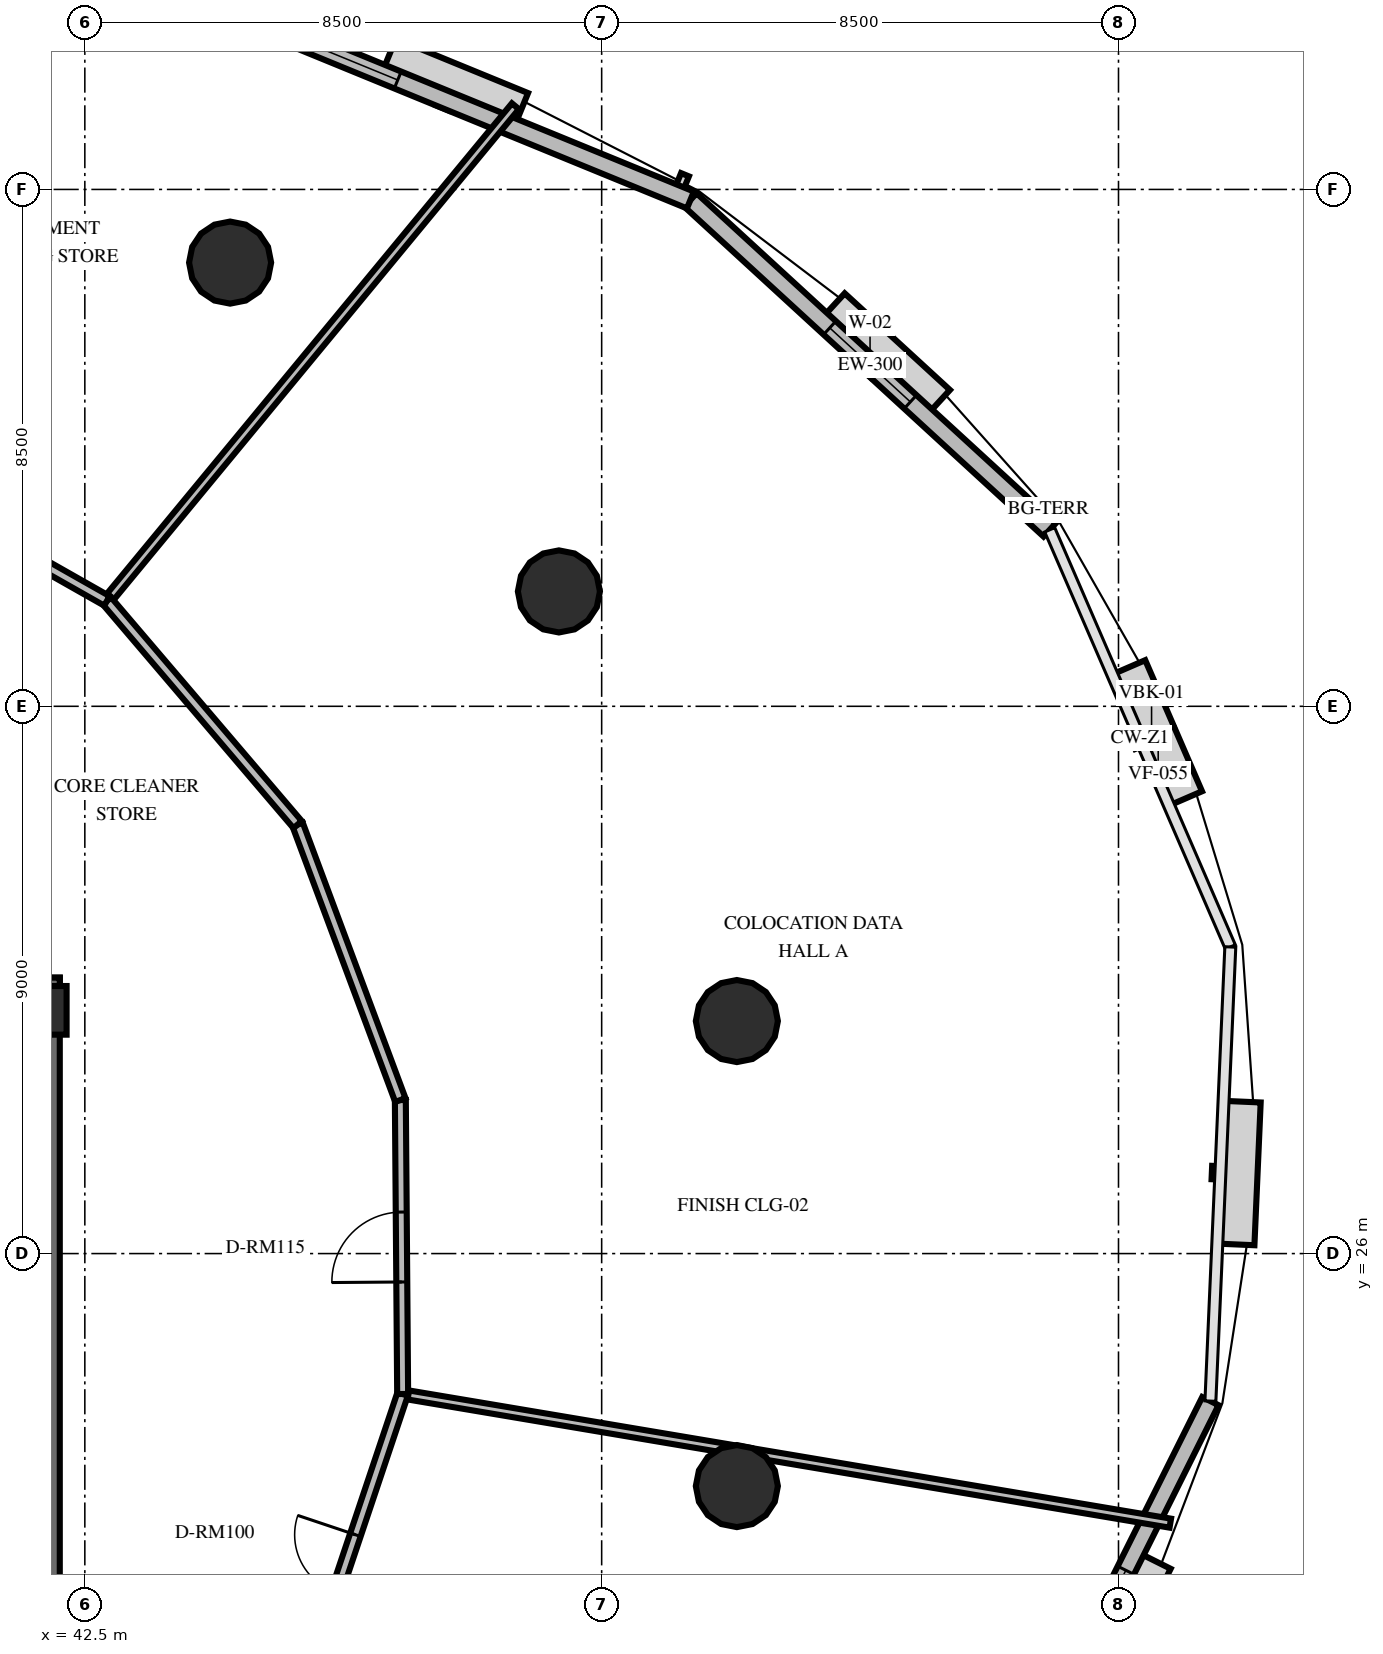
"""IFC4 building model, lengths in metres.
Left out: names, types, materials, properties, quantities, classifications, styles, units other than length and angle.
Written with IfcOpenShell. Run it as: python <this file> out.ifc"""

import sys

from ifc_helpers import new_model, si_unit, direction, frame, frame_2d, origin, origin_2d, place, context, subcontext, project, spatial, rectangle, circle, extrude, element, fill, save


model = new_model("IFC4")
c1 = context("Model", 3, precision=1e-05, world=origin(), true_north=direction((0.0, 1.0)))
c2 = subcontext(c1, "Body", "Model", "MODEL_VIEW")
j1 = project(units=[si_unit("LENGTHUNIT", "METRE"), si_unit("PLANEANGLEUNIT", "RADIAN")], contexts=[c1])
p1 = place(None, origin())
s1 = spatial("IfcSite", under=j1, at=p1, CompositionType="ELEMENT")
p2 = place(p1, origin())
s2 = spatial("IfcBuilding", under=s1, at=p2, CompositionType="ELEMENT")
p3 = place(p2, frame((0.0, 0.0, 76.2)))
s3 = spatial("IfcBuildingStorey", under=s2, at=p3, CompositionType="ELEMENT", Elevation=76.2)
p4 = place(p3, frame((25.922, 30.088, 0.0), z_axis=(0.0, 0.0, 1.0), x_axis=(1.0, 0.0, 0.0)))
e1 = element("IfcWall", 1, at=p4, inside=s3, PredefinedType="SHEAR", context=c2, shape_type="SweptSolid", body=[
    extrude(rectangle(XDim=16.166, YDim=0.9, at=frame_2d((8.083, 0.0))), origin(), (0.0, 0.0, 1.0), 4.2),
])
p5 = place(p4, frame((1.028, 0.0, 0.0)))
e2 = element("IfcOpeningElement", 2, at=p5, cuts=e1, PredefinedType="OPENING", context=c2, shape_type="SweptSolid", body=[
    extrude(rectangle(XDim=1.05, YDim=2.15, at=frame_2d((0.525, 1.075))), frame((0.0, 0.46, 0.0), z_axis=(0.0, -1.0, 0.0), x_axis=(1.0, 0.0, 0.0)), (0.0, 0.0, 1.0), 0.92),
])
p6 = place(p4, frame((14.078, 0.0, 0.0)))
e3 = element("IfcOpeningElement", 3, at=p6, cuts=e1, PredefinedType="OPENING", context=c2, shape_type="SweptSolid", body=[
    extrude(rectangle(XDim=1.05, YDim=2.15, at=frame_2d((0.525, 1.075))), frame((0.0, 0.46, 0.0), z_axis=(0.0, -1.0, 0.0), x_axis=(1.0, 0.0, 0.0)), (0.0, 0.0, 1.0), 0.92),
])
p7 = place(p4, frame((7.528, 0.0, 0.0)))
e4 = element("IfcOpeningElement", 4, at=p7, cuts=e1, PredefinedType="OPENING", context=c2, shape_type="SweptSolid", body=[
    extrude(rectangle(XDim=1.1, YDim=2.15, at=frame_2d((0.55, 1.075))), frame((0.0, 0.46, 0.0), z_axis=(0.0, -1.0, 0.0), x_axis=(1.0, 0.0, 0.0)), (0.0, 0.0, 1.0), 0.92),
])
p8 = place(p3, frame((41.638, 19.662, 0.0), z_axis=(0.0, 0.0, 1.0), x_axis=(0.0, 1.0, 0.0)))
e5 = element("IfcWall", 5, at=p8, inside=s3, PredefinedType="SHEAR", context=c2, shape_type="SweptSolid", body=[
    extrude(rectangle(XDim=10.876, YDim=0.9, at=frame_2d((5.438, 0.0))), origin(), (0.0, 0.0, 1.0), 4.2),
])
p9 = place(p3, frame((41.8, 30.0, 0.0), z_axis=(0.0, 0.0, 1.0), x_axis=(1.0, 0.0, 0.0)))
e6 = element("IfcColumn", 6, at=p9, inside=s3, PredefinedType="PILASTER", context=c2, shape_type="SweptSolid", body=[
    extrude(rectangle(XDim=0.8, YDim=0.8, at=origin_2d()), origin(), (0.0, 0.0, 1.0), 4.2),
])
for number, where, z_axis, x_axis in (
    (7, (53.223, 29.824, 0.0), (0.0, 0.0, 1.0), (1.0, 0.0, 0.0)),
    (8, (50.297, 36.889, 0.0), (0.0, 0.0, 1.0), (1.0, 0.0, 0.0)),
    (9, (44.889, 42.297, 0.0), (0.0, 0.0, 1.0), (1.0, 0.0, 0.0)),
    (10, (53.223, 22.176, 0.0), (0.0, 0.0, 1.0), (1.0, 0.0, 0.0)),
):
    element("IfcColumn", number, at=place(p3, frame(where, z_axis=z_axis, x_axis=x_axis)), inside=s3, PredefinedType="COLUMN", context=c2, shape_type="SweptSolid", body=[
        extrude(circle(Radius=0.675, at=origin_2d()), origin(), (0.0, 0.0, 1.0), 4.2),
    ])
p10 = place(p3, frame((58.369, 37.902, 0.0), z_axis=(0.0, 0.0, 1.0), x_axis=(-0.736682732999, 0.676238531068, 0.0)))
e11 = element("IfcWall", 11, at=p10, inside=s3, PredefinedType="SOLIDWALL", context=c2, shape_type="SweptSolid", body=[
    extrude(rectangle(XDim=8.022, YDim=0.3, at=frame_2d((4.011, 0.0))), origin(), (0.0, 0.0, 1.0), 3.0),
])
p11 = place(p10, frame((3.111, 0.0, 0.8)))
e12 = element("IfcOpeningElement", 12, at=p11, cuts=e11, PredefinedType="OPENING", context=c2, shape_type="SweptSolid", body=[
    extrude(rectangle(XDim=1.8, YDim=1.95, at=frame_2d((0.9, 0.975))), frame((0.0, 0.16, 0.0), z_axis=(0.0, -1.0, 0.0), x_axis=(1.0, 0.0, 0.0)), (0.0, 0.0, 1.0), 0.32),
])
p12 = place(p3, frame((52.459, 43.327, 0.0), z_axis=(0.0, 0.0, 1.0), x_axis=(-0.925289325161, 0.379262000131, 0.0)))
e13 = element("IfcWall", 13, at=p12, inside=s3, PredefinedType="SOLIDWALL", context=c2, shape_type="SweptSolid", body=[
    extrude(rectangle(XDim=8.793, YDim=0.3, at=frame_2d((4.396, 0.0))), origin(), (0.0, 0.0, 1.0), 3.0),
])
p13 = place(p12, frame((5.202, 0.0, 0.8)))
e14 = element("IfcOpeningElement", 14, at=p13, cuts=e13, PredefinedType="OPENING", context=c2, shape_type="SweptSolid", body=[
    extrude(rectangle(XDim=1.8, YDim=1.95, at=frame_2d((0.9, 0.975))), frame((0.0, 0.16, 0.0), z_axis=(0.0, -1.0, 0.0), x_axis=(1.0, 0.0, 0.0)), (0.0, 0.0, 1.0), 0.32),
])
p14 = place(p3, frame((57.426, 16.398, 0.0), z_axis=(0.0, 0.0, 1.0), x_axis=(0.44697009801, 0.894548898319, 0.0)))
e15 = element("IfcWall", 15, at=p14, inside=s3, PredefinedType="SOLIDWALL", context=c2, shape_type="SweptSolid", body=[
    extrude(rectangle(XDim=8.022, YDim=0.3, at=frame_2d((4.011, 0.0))), origin(), (0.0, 0.0, 1.0), 3.0),
])
p15 = place(p14, frame((3.111, 0.0, 0.8)))
e16 = element("IfcOpeningElement", 16, at=p15, cuts=e15, PredefinedType="OPENING", context=c2, shape_type="SweptSolid", body=[
    extrude(rectangle(XDim=1.8, YDim=1.95, at=frame_2d((0.9, 0.975))), frame((0.0, 0.16, 0.0), z_axis=(0.0, -1.0, 0.0), x_axis=(1.0, 0.0, 0.0)), (0.0, 0.0, 1.0), 0.32),
])
p16 = place(p3, frame((47.727, 23.691, 0.0), z_axis=(0.0, 0.0, 1.0), x_axis=(0.986140728359, -0.165911011907, 0.0)))
e17 = element("IfcWall", 17, at=p16, inside=s3, PredefinedType="PARTITIONING", context=c2, shape_type="SweptSolid", body=[
    extrude(rectangle(XDim=12.802, YDim=0.15, at=frame_2d((6.401, 0.0))), origin(), (0.0, 0.0, 1.0), 3.0),
])
p17 = place(p3, frame((46.342, 19.562, 0.0), z_axis=(0.0, 0.0, 1.0), x_axis=(0.318127487837, 0.948047942608, 0.0)))
e18 = element("IfcWall", 18, at=p17, inside=s3, PredefinedType="PARTITIONING", context=c2, shape_type="SweptSolid", body=[
    extrude(rectangle(XDim=4.355, YDim=0.18, at=frame_2d((2.178, 0.0))), origin(), (0.0, 0.0, 1.0), 3.0),
])
p18 = place(p17, frame((0.914, 0.0, 0.0)))
e19 = element("IfcOpeningElement", 19, at=p18, cuts=e18, PredefinedType="OPENING", context=c2, shape_type="SweptSolid", body=[
    extrude(rectangle(XDim=1.0, YDim=2.15, at=frame_2d((0.5, 1.075))), frame((0.0, 0.1, 0.0), z_axis=(0.0, -1.0, 0.0), x_axis=(1.0, 0.0, 0.0)), (0.0, 0.0, 1.0), 0.2),
])
p19 = place(p3, frame((42.864, 36.733, 0.0), z_axis=(0.0, 0.0, 1.0), x_axis=(0.636757052036, 0.771064495799, 0.0)))
e20 = element("IfcWall", 20, at=p19, inside=s3, PredefinedType="PARTITIONING", context=c2, shape_type="SweptSolid", body=[
    extrude(rectangle(XDim=10.55, YDim=0.15, at=frame_2d((5.275, 0.0))), origin(), (0.0, 0.0, 1.0), 3.0),
])
p20 = place(p3, frame((47.727, 23.691, 0.0), z_axis=(0.0, 0.0, 1.0), x_axis=(-0.007827647661, 0.999969363497, 0.0)))
e21 = element("IfcWall", 21, at=p20, inside=s3, PredefinedType="PARTITIONING", context=c2, shape_type="SweptSolid", body=[
    extrude(rectangle(XDim=4.834, YDim=0.18, at=frame_2d((2.417, 0.0))), origin(), (0.0, 0.0, 1.0), 3.0),
])
p21 = place(p20, frame((1.842, 0.0, 0.0)))
e22 = element("IfcOpeningElement", 22, at=p21, cuts=e21, PredefinedType="OPENING", context=c2, shape_type="SweptSolid", body=[
    extrude(rectangle(XDim=1.15, YDim=2.15, at=frame_2d((0.575, 1.075))), frame((0.0, 0.1, 0.0), z_axis=(0.0, -1.0, 0.0), x_axis=(1.0, 0.0, 0.0)), (0.0, 0.0, 1.0), 0.2),
])
p22 = place(p3, frame((47.689, 28.525, 0.0), z_axis=(0.0, 0.0, 1.0), x_axis=(-0.349423780352, 0.936964792148, 0.0)))
e23 = element("IfcWall", 23, at=p22, inside=s3, PredefinedType="PARTITIONING", context=c2, shape_type="SweptSolid", body=[
    extrude(rectangle(XDim=4.834, YDim=0.18, at=frame_2d((2.417, 0.0))), origin(), (0.0, 0.0, 1.0), 3.0),
])
p23 = place(p3, frame((46.0, 33.054, 0.0), z_axis=(0.0, 0.0, 1.0), x_axis=(-0.648772052091, 0.760982801662, 0.0)))
e24 = element("IfcWall", 24, at=p23, inside=s3, PredefinedType="PARTITIONING", context=c2, shape_type="SweptSolid", body=[
    extrude(rectangle(XDim=4.834, YDim=0.18, at=frame_2d((2.417, 0.0))), origin(), (0.0, 0.0, 1.0), 3.0),
])
p24 = place(p3, frame((42.864, 36.733, 0.0), z_axis=(0.0, 0.0, 1.0), x_axis=(-0.869944192354, 0.493150182186, 0.0)))
e25 = element("IfcWall", 25, at=p24, inside=s3, PredefinedType="PARTITIONING", context=c2, shape_type="SweptSolid", body=[
    extrude(rectangle(XDim=4.834, YDim=0.18, at=frame_2d((2.417, 0.0))), origin(), (0.0, 0.0, 1.0), 3.0),
])
p25 = place(p24, frame((2.801, 0.0, 0.0)))
e26 = element("IfcOpeningElement", 26, at=p25, cuts=e25, PredefinedType="OPENING", context=c2, shape_type="SweptSolid", body=[
    extrude(rectangle(XDim=1.0, YDim=2.15, at=frame_2d((0.5, 1.075))), frame((0.0, 0.1, 0.0), z_axis=(0.0, -1.0, 0.0), x_axis=(1.0, 0.0, 0.0)), (0.0, 0.0, 1.0), 0.2),
])
p26 = place(p11, origin())
e27 = element("IfcWindow", 27, at=p26, inside=s3, PartitioningType="SINGLE_PANEL", PredefinedType="WINDOW", context=c2, shape_type="SweptSolid", body=[
    extrude(rectangle(XDim=1.8, YDim=1.95, at=frame_2d((0.9, 0.975))), frame((0.0, 0.03, 0.0), z_axis=(0.0, -1.0, 0.0), x_axis=(1.0, 0.0, 0.0)), (0.0, 0.0, 1.0), 0.06),
])
fill(e12, e27)
p27 = place(p13, origin())
e28 = element("IfcWindow", 28, at=p27, inside=s3, PartitioningType="SINGLE_PANEL", PredefinedType="WINDOW", context=c2, shape_type="SweptSolid", body=[
    extrude(rectangle(XDim=1.8, YDim=1.95, at=frame_2d((0.9, 0.975))), frame((0.0, 0.03, 0.0), z_axis=(0.0, -1.0, 0.0), x_axis=(1.0, 0.0, 0.0)), (0.0, 0.0, 1.0), 0.06),
])
fill(e14, e28)
p28 = place(p15, origin())
e29 = element("IfcWindow", 29, at=p28, inside=s3, PartitioningType="SINGLE_PANEL", PredefinedType="WINDOW", context=c2, shape_type="SweptSolid", body=[
    extrude(rectangle(XDim=1.8, YDim=1.95, at=frame_2d((0.9, 0.975))), frame((0.0, 0.03, 0.0), z_axis=(0.0, -1.0, 0.0), x_axis=(1.0, 0.0, 0.0)), (0.0, 0.0, 1.0), 0.06),
])
fill(e16, e29)
p29 = place(p18, origin())
e30 = element("IfcDoor", 30, at=p29, inside=s3, OperationType="SINGLE_SWING_RIGHT", PredefinedType="DOOR", context=c2, shape_type="SweptSolid", body=[
    extrude(rectangle(XDim=1.0, YDim=2.15, at=frame_2d((0.5, 1.075))), frame((0.0, 0.025, 0.0), z_axis=(0.0, -1.0, 0.0), x_axis=(1.0, 0.0, 0.0)), (0.0, 0.0, 1.0), 0.05),
])
fill(e19, e30)
p30 = place(p21, origin())
e31 = element("IfcDoor", 31, at=p30, inside=s3, OperationType="SINGLE_SWING_LEFT", PredefinedType="DOOR", context=c2, shape_type="SweptSolid", body=[
    extrude(rectangle(XDim=1.15, YDim=2.15, at=frame_2d((0.575, 1.075))), frame((0.0, 0.025, 0.0), z_axis=(0.0, -1.0, 0.0), x_axis=(1.0, 0.0, 0.0)), (0.0, 0.0, 1.0), 0.05),
])
fill(e22, e31)
save(model, sys.argv[1])
